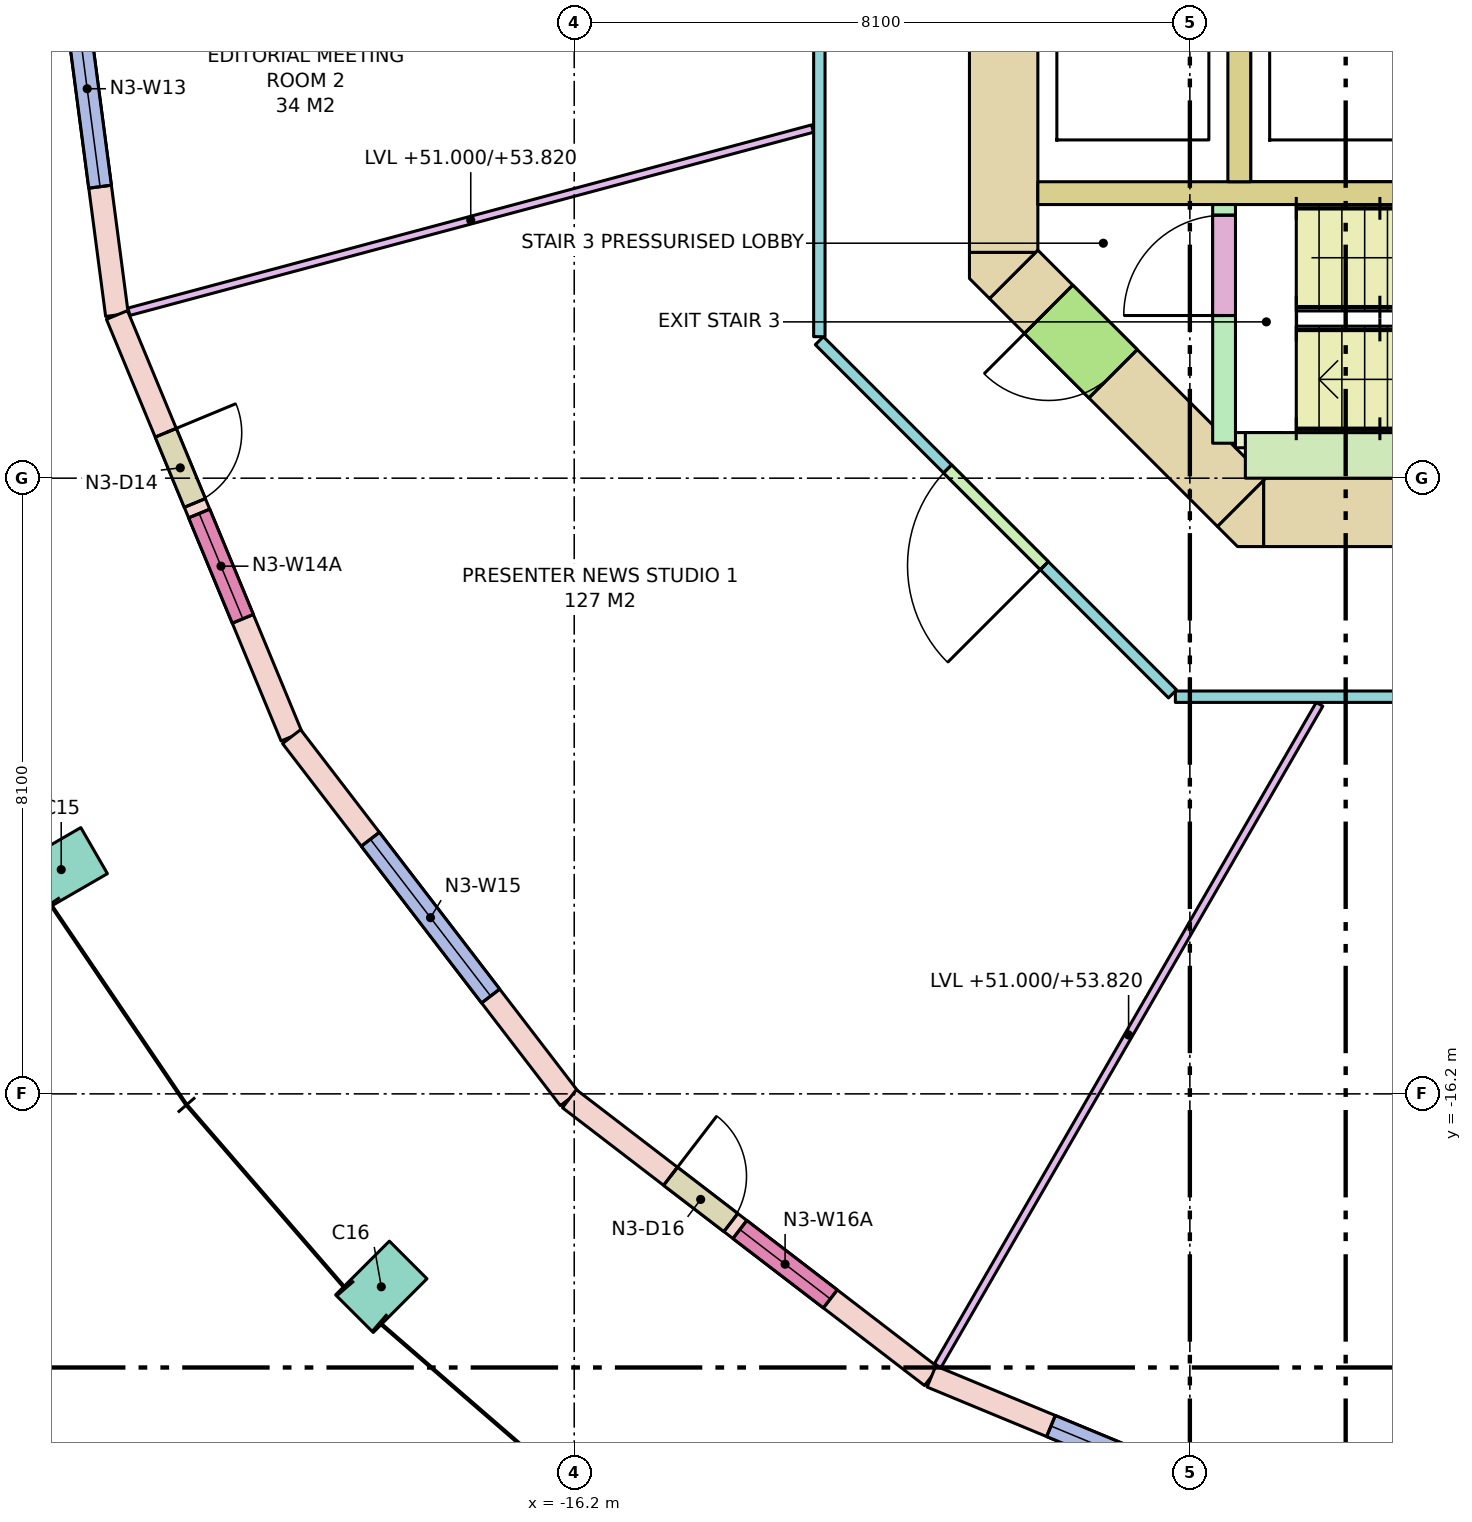
"""IFC4 building model, lengths in metres.
Left out: names, types, materials, properties, quantities, classifications, styles, units other than length and angle.
Written with IfcOpenShell. Run it as: python <this file> out.ifc"""

import sys

from ifc_helpers import new_model, si_unit, direction, frame, frame_2d, origin, origin_2d, place, context, subcontext, project, spatial, polyline, rectangle, outline, extrude, element, fill, save


model = new_model("IFC4")
c1 = context("Model", 3, precision=1e-05, world=origin(), true_north=direction((0.0, 1.0)))
c2 = subcontext(c1, "Body", "Model", "MODEL_VIEW")
j1 = project(units=[si_unit("LENGTHUNIT", "METRE"), si_unit("PLANEANGLEUNIT", "RADIAN")], contexts=[c1])
p1 = place(None, origin())
s1 = spatial("IfcSite", under=j1, at=p1, CompositionType="ELEMENT")
p2 = place(p1, origin())
s2 = spatial("IfcBuilding", under=s1, at=p2, CompositionType="ELEMENT")
p3 = place(p2, frame((0.0, 0.0, 51.0)))
s3 = spatial("IfcBuildingStorey", under=s2, at=p3, CompositionType="ELEMENT", Elevation=51.0)
for number, where, z_axis, x_axis in (
    (1, (-22.95, -13.25, 0.0), (0.0, 0.0, 1.0), (0.5, -0.866, 0.0)),
    (2, (-18.738, -18.738, 0.0), (0.0, 0.0, 1.0), (0.707, -0.707, 0.0)),
):
    element("IfcColumn", number, at=place(p3, frame(where, z_axis=z_axis, x_axis=x_axis)), inside=s3, PredefinedType="COLUMN", context=c2, shape_type="SweptSolid", body=[
        extrude(rectangle(XDim=0.7, YDim=1.0, at=origin_2d()), origin(), (0.0, 0.0, 1.0), 4.0),
    ])
p4 = place(p3, frame((-7.13, -8.55, -0.28), z_axis=(0.0, 0.0, 1.0), x_axis=(1.0, 0.0, 0.0)))
e3 = element("IfcWall", 3, at=p4, inside=s3, PredefinedType="SHEAR", context=c2, shape_type="SweptSolid", body=[
    extrude(rectangle(XDim=14.26, YDim=0.9, at=frame_2d((7.13, 0.0))), origin(), (0.0, 0.0, 1.0), 4.0),
])
p5 = place(p4, frame((8.08, 0.0, 0.28)))
e4 = element("IfcOpeningElement", 4, at=p5, cuts=e3, PredefinedType="OPENING", context=c2, shape_type="SweptSolid", body=[
    extrude(rectangle(XDim=0.7, YDim=2.1, at=frame_2d((0.35, 1.05))), frame((0.0, 0.46, 0.0), z_axis=(0.0, -1.0, 0.0), x_axis=(1.0, 0.0, 0.0)), (0.0, 0.0, 1.0), 0.92),
])
p6 = place(p4, frame((5.58, 0.0, 0.28)))
e5 = element("IfcOpeningElement", 5, at=p6, cuts=e3, PredefinedType="OPENING", context=c2, shape_type="SweptSolid", body=[
    extrude(rectangle(XDim=0.85, YDim=2.1, at=frame_2d((0.425, 1.05))), frame((0.0, 0.46, 0.0), z_axis=(0.0, -1.0, 0.0), x_axis=(1.0, 0.0, 0.0)), (0.0, 0.0, 1.0), 0.92),
])
p7 = place(p4, frame((6.88, 0.0, 0.28)))
e6 = element("IfcOpeningElement", 6, at=p7, cuts=e3, PredefinedType="OPENING", context=c2, shape_type="SweptSolid", body=[
    extrude(rectangle(XDim=0.85, YDim=2.1, at=frame_2d((0.425, 1.05))), frame((0.0, 0.46, 0.0), z_axis=(0.0, -1.0, 0.0), x_axis=(1.0, 0.0, 0.0)), (0.0, 0.0, 1.0), 0.92),
])
p8 = place(p4, frame((9.521, 0.0, 0.28)))
e7 = element("IfcOpeningElement", 7, at=p8, cuts=e3, PredefinedType="OPENING", context=c2, shape_type="SweptSolid", body=[
    extrude(rectangle(XDim=0.9, YDim=2.1, at=frame_2d((0.45, 1.05))), frame((0.0, 0.46, 0.0), z_axis=(0.0, -1.0, 0.0), x_axis=(1.0, 0.0, 0.0)), (0.0, 0.0, 1.0), 0.92),
])
p9 = place(p4, frame((11.278, 0.0, 0.28)))
e8 = element("IfcOpeningElement", 8, at=p9, cuts=e3, PredefinedType="OPENING", context=c2, shape_type="SweptSolid", body=[
    extrude(rectangle(XDim=0.9, YDim=2.1, at=frame_2d((0.45, 1.05))), frame((0.0, 0.46, 0.0), z_axis=(0.0, -1.0, 0.0), x_axis=(1.0, 0.0, 0.0)), (0.0, 0.0, 1.0), 0.92),
])
p10 = place(p4, frame((12.84, 0.0, 0.28)))
e9 = element("IfcOpeningElement", 9, at=p10, cuts=e3, PredefinedType="OPENING", context=c2, shape_type="SweptSolid", body=[
    extrude(rectangle(XDim=0.9, YDim=2.1, at=frame_2d((0.45, 1.05))), frame((0.0, 0.46, 0.0), z_axis=(0.0, -1.0, 0.0), x_axis=(1.0, 0.0, 0.0)), (0.0, 0.0, 1.0), 0.92),
])
p11 = place(p3, frame((-10.55, -5.13, -0.28), z_axis=(0.0, 0.0, 1.0), x_axis=(0.0, 1.0, 0.0)))
e10 = element("IfcWall", 10, at=p11, inside=s3, PredefinedType="SHEAR", context=c2, shape_type="SweptSolid", body=[
    extrude(rectangle(XDim=10.26, YDim=0.9, at=frame_2d((5.13, 0.0))), origin(), (0.0, 0.0, 1.0), 4.0),
])
p12 = place(p11, frame((4.13, 0.0, 0.28)))
e11 = element("IfcOpeningElement", 11, at=p12, cuts=e10, PredefinedType="OPENING", context=c2, shape_type="SweptSolid", body=[
    extrude(rectangle(XDim=2.0, YDim=2.1, at=frame_2d((1.0, 1.05))), frame((0.0, 0.46, 0.0), z_axis=(0.0, -1.0, 0.0), x_axis=(1.0, 0.0, 0.0)), (0.0, 0.0, 1.0), 0.92),
])
p13 = place(p3, frame((-7.418, -8.418, -0.28), z_axis=(0.0, 0.0, 1.0), x_axis=(-0.707106781187, 0.707106781187, 0.0)))
e12 = element("IfcWall", 12, at=p13, inside=s3, PredefinedType="SHEAR", context=c2, shape_type="SweptSolid", body=[
    extrude(rectangle(XDim=4.243, YDim=0.9, at=frame_2d((2.121, 0.0))), origin(), (0.0, 0.0, 1.0), 4.0),
])
p14 = place(p13, frame((2.393, 0.0, 0.28)))
e13 = element("IfcOpeningElement", 13, at=p14, cuts=e12, PredefinedType="OPENING", context=c2, shape_type="SweptSolid", body=[
    extrude(rectangle(XDim=1.2, YDim=2.1, at=frame_2d((0.6, 1.05))), frame((0.0, 0.46, 0.0), z_axis=(0.0, -1.0, 0.0), x_axis=(1.0, 0.0, 0.0)), (0.0, 0.0, 1.0), 0.92),
])
p15 = place(p3, frame((0.0, 0.0, -0.28)))
e14 = element("IfcWall", 14, at=p15, inside=s3, PredefinedType="SHEAR", context=c2, shape_type="SweptSolid", body=[
    extrude(outline(polyline([(-7.473, -9.0), (-7.736, -8.736), (-7.13, -8.13), (-7.13, -9.0), (-7.473, -9.0)])), origin(), (0.0, 0.0, 1.0), 4.0),
])
p16 = place(p3, frame((0.0, 0.0, -0.28)))
e15 = element("IfcWall", 15, at=p16, inside=s3, PredefinedType="SHEAR", context=c2, shape_type="SweptSolid", body=[
    extrude(outline(polyline([(-11.0, -5.473), (-11.0, -5.13), (-10.13, -5.13), (-10.736, -5.736), (-11.0, -5.473)])), origin(), (0.0, 0.0, 1.0), 4.0),
])
p17 = place(p3, frame((-10.1, -4.35, 0.0), z_axis=(0.0, 0.0, 1.0), x_axis=(1.0, 0.0, 0.0)))
e16 = element("IfcWall", 16, at=p17, inside=s3, PredefinedType="SOLIDWALL", context=c2, shape_type="SweptSolid", body=[
    extrude(rectangle(XDim=8.1, YDim=0.3, at=frame_2d((4.05, 0.0))), origin(), (0.0, 0.0, 1.0), 3.72),
])
p18 = place(p3, frame((-7.45, -4.2, 0.0), z_axis=(0.0, 0.0, 1.0), x_axis=(0.0, 1.0, 0.0)))
e17 = element("IfcWall", 17, at=p18, inside=s3, PredefinedType="SOLIDWALL", context=c2, shape_type="SweptSolid", body=[
    extrude(rectangle(XDim=2.4, YDim=0.3, at=frame_2d((1.2, 0.0))), origin(), (0.0, 0.0, 1.0), 3.72),
])
p19 = place(p3, frame((-7.65, -7.64, 0.0), z_axis=(0.0, 0.0, 1.0), x_axis=(0.0, 1.0, 0.0)))
e18 = element("IfcWall", 18, at=p19, inside=s3, PredefinedType="SHEAR", context=c2, shape_type="SweptSolid", body=[
    extrude(rectangle(XDim=3.14, YDim=0.3, at=frame_2d((1.57, 0.0))), origin(), (0.0, 0.0, 1.0), 3.72),
])
p20 = place(p19, frame((1.68, 0.0, 0.0)))
e19 = element("IfcOpeningElement", 19, at=p20, cuts=e18, PredefinedType="OPENING", context=c2, shape_type="SweptSolid", body=[
    extrude(rectangle(XDim=1.32, YDim=2.1, at=frame_2d((0.66, 1.05))), frame((0.0, 0.16, 0.0), z_axis=(0.0, -1.0, 0.0), x_axis=(1.0, 0.0, 0.0)), (0.0, 0.0, 1.0), 0.32),
])
p21 = place(p3, frame((-7.5, -7.6, 0.0), z_axis=(0.0, 0.0, 1.0), x_axis=(1.0, 0.0, 0.0)))
e20 = element("IfcWall", 20, at=p21, inside=s3, PredefinedType="SHEAR", context=c2, shape_type="SweptSolid", body=[
    extrude(rectangle(XDim=0.6, YDim=0.2, at=frame_2d((0.3, 0.0))), origin(), (0.0, 0.0, 1.0), 3.72),
])
p22 = place(p3, frame((-7.37, -7.8, 0.0), z_axis=(0.0, 0.0, 1.0), x_axis=(1.0, 0.0, 0.0)))
e21 = element("IfcWall", 21, at=p22, inside=s3, PredefinedType="SHEAR", context=c2, shape_type="SweptSolid", body=[
    extrude(rectangle(XDim=5.37, YDim=0.6, at=frame_2d((2.685, 0.0))), origin(), (0.0, 0.0, 1.0), 3.72),
])
p23 = place(p3, frame((-23.0, 0.0, 0.0), z_axis=(0.0, 0.0, 1.0), x_axis=(0.130522880875, -0.991445297315, 0.0)))
e22 = element("IfcWall", 22, at=p23, inside=s3, PredefinedType="STANDARD", context=c2, shape_type="SweptSolid", body=[
    extrude(rectangle(XDim=6.004, YDim=0.3, at=frame_2d((3.002, 0.0))), origin(), (0.0, 0.0, 1.0), 3.72),
])
p24 = place(p23, frame((1.702, 0.0, 0.8)))
e23 = element("IfcOpeningElement", 23, at=p24, cuts=e22, PredefinedType="OPENING", context=c2, shape_type="SweptSolid", body=[
    extrude(rectangle(XDim=2.6, YDim=2.7, at=frame_2d((1.3, 1.35))), frame((0.0, 0.16, 0.0), z_axis=(0.0, -1.0, 0.0), x_axis=(1.0, 0.0, 0.0)), (0.0, 0.0, 1.0), 0.32),
])
p25 = place(p3, frame((-22.216, -5.953, 0.0), z_axis=(0.0, 0.0, 1.0), x_axis=(0.382671411433, -0.923884511653, 0.0)))
e24 = element("IfcWall", 24, at=p25, inside=s3, PredefinedType="STANDARD", context=c2, shape_type="SweptSolid", body=[
    extrude(rectangle(XDim=6.004, YDim=0.3, at=frame_2d((3.002, 0.0))), origin(), (0.0, 0.0, 1.0), 3.72),
])
p26 = place(p25, frame((1.677, 0.0, 0.0)))
e25 = element("IfcOpeningElement", 25, at=p26, cuts=e24, PredefinedType="OPENING", context=c2, shape_type="SweptSolid", body=[
    extrude(rectangle(XDim=1.0, YDim=2.4, at=frame_2d((0.5, 1.2))), frame((0.0, 0.16, 0.0), z_axis=(0.0, -1.0, 0.0), x_axis=(1.0, 0.0, 0.0)), (0.0, 0.0, 1.0), 0.32),
])
p27 = place(p25, frame((2.827, 0.0, 0.8)))
e26 = element("IfcOpeningElement", 26, at=p27, cuts=e24, PredefinedType="OPENING", context=c2, shape_type="SweptSolid", body=[
    extrude(rectangle(XDim=1.5, YDim=2.7, at=frame_2d((0.75, 1.35))), frame((0.0, 0.16, 0.0), z_axis=(0.0, -1.0, 0.0), x_axis=(1.0, 0.0, 0.0)), (0.0, 0.0, 1.0), 0.32),
])
p28 = place(p3, frame((-19.919, -11.5, 0.0), z_axis=(0.0, 0.0, 1.0), x_axis=(0.608778912074, -0.793339924758, 0.0)))
e27 = element("IfcWall", 27, at=p28, inside=s3, PredefinedType="STANDARD", context=c2, shape_type="SweptSolid", body=[
    extrude(rectangle(XDim=6.004, YDim=0.3, at=frame_2d((3.002, 0.0))), origin(), (0.0, 0.0, 1.0), 3.72),
])
p29 = place(p28, frame((1.702, 0.0, 0.8)))
e28 = element("IfcOpeningElement", 28, at=p29, cuts=e27, PredefinedType="OPENING", context=c2, shape_type="SweptSolid", body=[
    extrude(rectangle(XDim=2.6, YDim=2.7, at=frame_2d((1.3, 1.35))), frame((0.0, 0.16, 0.0), z_axis=(0.0, -1.0, 0.0), x_axis=(1.0, 0.0, 0.0)), (0.0, 0.0, 1.0), 0.32),
])
p30 = place(p3, frame((-16.263, -16.263, 0.0), z_axis=(0.0, 0.0, 1.0), x_axis=(0.793339924758, -0.608778912074, 0.0)))
e29 = element("IfcWall", 29, at=p30, inside=s3, PredefinedType="STANDARD", context=c2, shape_type="SweptSolid", body=[
    extrude(rectangle(XDim=6.004, YDim=0.3, at=frame_2d((3.002, 0.0))), origin(), (0.0, 0.0, 1.0), 3.72),
])
p31 = place(p30, frame((1.677, 0.0, 0.0)))
e30 = element("IfcOpeningElement", 30, at=p31, cuts=e29, PredefinedType="OPENING", context=c2, shape_type="SweptSolid", body=[
    extrude(rectangle(XDim=1.0, YDim=2.4, at=frame_2d((0.5, 1.2))), frame((0.0, 0.16, 0.0), z_axis=(0.0, -1.0, 0.0), x_axis=(1.0, 0.0, 0.0)), (0.0, 0.0, 1.0), 0.32),
])
p32 = place(p30, frame((2.827, 0.0, 0.8)))
e31 = element("IfcOpeningElement", 31, at=p32, cuts=e29, PredefinedType="OPENING", context=c2, shape_type="SweptSolid", body=[
    extrude(rectangle(XDim=1.5, YDim=2.7, at=frame_2d((0.75, 1.35))), frame((0.0, 0.16, 0.0), z_axis=(0.0, -1.0, 0.0), x_axis=(1.0, 0.0, 0.0)), (0.0, 0.0, 1.0), 0.32),
])
p33 = place(p3, frame((-11.5, -19.919, 0.0), z_axis=(0.0, 0.0, 1.0), x_axis=(0.923884511653, -0.382671411433, 0.0)))
e32 = element("IfcWall", 32, at=p33, inside=s3, PredefinedType="STANDARD", context=c2, shape_type="SweptSolid", body=[
    extrude(rectangle(XDim=6.004, YDim=0.3, at=frame_2d((3.002, 0.0))), origin(), (0.0, 0.0, 1.0), 3.72),
])
p34 = place(p33, frame((1.702, 0.0, 0.8)))
e33 = element("IfcOpeningElement", 33, at=p34, cuts=e32, PredefinedType="OPENING", context=c2, shape_type="SweptSolid", body=[
    extrude(rectangle(XDim=2.6, YDim=2.7, at=frame_2d((1.3, 1.35))), frame((0.0, 0.16, 0.0), z_axis=(0.0, -1.0, 0.0), x_axis=(1.0, 0.0, 0.0)), (0.0, 0.0, 1.0), 0.32),
])
p35 = place(p3, frame((-1.275, -10.975, 0.0), z_axis=(0.0, 0.0, 1.0), x_axis=(-1.0, 0.0, 0.0)))
e34 = element("IfcWall", 34, at=p35, inside=s3, PredefinedType="PARTITIONING", context=c2, shape_type="SweptSolid", body=[
    extrude(rectangle(XDim=7.016, YDim=0.15, at=frame_2d((3.508, 0.0))), origin(), (0.0, 0.0, 1.0), 2.82),
])
p36 = place(p3, frame((-8.328, -10.938, 0.0), z_axis=(0.0, 0.0, 1.0), x_axis=(-0.707125355289, 0.707088206597, 0.0)))
e35 = element("IfcWall", 35, at=p36, inside=s3, PredefinedType="PARTITIONING", context=c2, shape_type="SweptSolid", body=[
    extrude(rectangle(XDim=6.572, YDim=0.15, at=frame_2d((3.286, 0.0))), origin(), (0.0, 0.0, 1.0), 2.82),
])
p37 = place(p36, frame((2.386, 0.0, 0.0)))
e36 = element("IfcOpeningElement", 36, at=p37, cuts=e35, PredefinedType="OPENING", context=c2, shape_type="SweptSolid", body=[
    extrude(rectangle(XDim=1.8, YDim=2.1, at=frame_2d((0.9, 1.05))), frame((0.0, 0.085, 0.0), z_axis=(0.0, -1.0, 0.0), x_axis=(1.0, 0.0, 0.0)), (0.0, 0.0, 1.0), 0.17),
])
p38 = place(p3, frame((-12.975, -6.238, 0.0), z_axis=(0.0, 0.0, 1.0), x_axis=(0.0, 1.0, 0.0)))
e37 = element("IfcWall", 37, at=p38, inside=s3, PredefinedType="PARTITIONING", context=c2, shape_type="SweptSolid", body=[
    extrude(rectangle(XDim=4.963, YDim=0.15, at=frame_2d((2.482, 0.0))), origin(), (0.0, 0.0, 1.0), 2.82),
])
p39 = place(p3, frame((-13.064, -3.5, 0.0), z_axis=(0.0, 0.0, 1.0), x_axis=(-0.965922655056, -0.258830880017, 0.0)))
e38 = element("IfcWall", 38, at=p39, inside=s3, PredefinedType="PARTITIONING", context=c2, shape_type="SweptSolid", body=[
    extrude(rectangle(XDim=9.312, YDim=0.1, at=frame_2d((4.656, 0.0))), origin(), (0.0, 0.0, 1.0), 2.82),
])
p40 = place(p3, frame((-6.394, -11.075, 0.0), z_axis=(0.0, 0.0, 1.0), x_axis=(-0.500024592647, -0.866011204747, 0.0)))
e39 = element("IfcWall", 39, at=p40, inside=s3, PredefinedType="PARTITIONING", context=c2, shape_type="SweptSolid", body=[
    extrude(rectangle(XDim=10.049, YDim=0.1, at=frame_2d((5.024, 0.0))), origin(), (0.0, 0.0, 1.0), 2.82),
])
p41 = place(p24, origin())
e40 = element("IfcWindow", 40, at=p41, inside=s3, PartitioningType="SINGLE_PANEL", PredefinedType="WINDOW", context=c2, shape_type="SweptSolid", body=[
    extrude(rectangle(XDim=2.6, YDim=2.7, at=frame_2d((1.3, 1.35))), frame((0.0, 0.03, 0.0), z_axis=(0.0, -1.0, 0.0), x_axis=(1.0, 0.0, 0.0)), (0.0, 0.0, 1.0), 0.06),
])
fill(e23, e40)
p42 = place(p26, origin())
e41 = element("IfcDoor", 41, at=p42, inside=s3, OperationType="SINGLE_SWING_LEFT", PredefinedType="DOOR", context=c2, shape_type="SweptSolid", body=[
    extrude(rectangle(XDim=1.0, YDim=2.4, at=frame_2d((0.5, 1.2))), frame((0.0, 0.025, 0.0), z_axis=(0.0, -1.0, 0.0), x_axis=(1.0, 0.0, 0.0)), (0.0, 0.0, 1.0), 0.05),
])
fill(e25, e41)
p43 = place(p27, origin())
e42 = element("IfcWindow", 42, at=p43, inside=s3, PartitioningType="SINGLE_PANEL", PredefinedType="WINDOW", context=c2, shape_type="SweptSolid", body=[
    extrude(rectangle(XDim=1.5, YDim=2.7, at=frame_2d((0.75, 1.35))), frame((0.0, 0.03, 0.0), z_axis=(0.0, -1.0, 0.0), x_axis=(1.0, 0.0, 0.0)), (0.0, 0.0, 1.0), 0.06),
])
fill(e26, e42)
p44 = place(p29, origin())
e43 = element("IfcWindow", 43, at=p44, inside=s3, PartitioningType="SINGLE_PANEL", PredefinedType="WINDOW", context=c2, shape_type="SweptSolid", body=[
    extrude(rectangle(XDim=2.6, YDim=2.7, at=frame_2d((1.3, 1.35))), frame((0.0, 0.03, 0.0), z_axis=(0.0, -1.0, 0.0), x_axis=(1.0, 0.0, 0.0)), (0.0, 0.0, 1.0), 0.06),
])
fill(e28, e43)
p45 = place(p31, origin())
e44 = element("IfcDoor", 44, at=p45, inside=s3, OperationType="SINGLE_SWING_LEFT", PredefinedType="DOOR", context=c2, shape_type="SweptSolid", body=[
    extrude(rectangle(XDim=1.0, YDim=2.4, at=frame_2d((0.5, 1.2))), frame((0.0, 0.025, 0.0), z_axis=(0.0, -1.0, 0.0), x_axis=(1.0, 0.0, 0.0)), (0.0, 0.0, 1.0), 0.05),
])
fill(e30, e44)
p46 = place(p32, origin())
e45 = element("IfcWindow", 45, at=p46, inside=s3, PartitioningType="SINGLE_PANEL", PredefinedType="WINDOW", context=c2, shape_type="SweptSolid", body=[
    extrude(rectangle(XDim=1.5, YDim=2.7, at=frame_2d((0.75, 1.35))), frame((0.0, 0.03, 0.0), z_axis=(0.0, -1.0, 0.0), x_axis=(1.0, 0.0, 0.0)), (0.0, 0.0, 1.0), 0.06),
])
fill(e31, e45)
p47 = place(p34, origin())
e46 = element("IfcWindow", 46, at=p47, inside=s3, PartitioningType="SINGLE_PANEL", PredefinedType="WINDOW", context=c2, shape_type="SweptSolid", body=[
    extrude(rectangle(XDim=2.6, YDim=2.7, at=frame_2d((1.3, 1.35))), frame((0.0, 0.03, 0.0), z_axis=(0.0, -1.0, 0.0), x_axis=(1.0, 0.0, 0.0)), (0.0, 0.0, 1.0), 0.06),
])
fill(e33, e46)
p48 = place(p20, origin())
e47 = element("IfcDoor", 47, at=p48, inside=s3, OperationType="DOUBLE_DOOR_SINGLE_SWING", PredefinedType="DOOR", context=c2, shape_type="SweptSolid", body=[
    extrude(rectangle(XDim=1.32, YDim=2.1, at=frame_2d((0.66, 1.05))), frame((0.0, 0.025, 0.0), z_axis=(0.0, -1.0, 0.0), x_axis=(1.0, 0.0, 0.0)), (0.0, 0.0, 1.0), 0.05),
])
fill(e19, e47)
p49 = place(p14, origin())
e48 = element("IfcDoor", 48, at=p49, inside=s3, OperationType="SINGLE_SWING_RIGHT", PredefinedType="DOOR", context=c2, shape_type="SweptSolid", body=[
    extrude(rectangle(XDim=1.2, YDim=2.1, at=frame_2d((0.6, 1.05))), frame((0.0, 0.025, 0.0), z_axis=(0.0, -1.0, 0.0), x_axis=(1.0, 0.0, 0.0)), (0.0, 0.0, 1.0), 0.05),
])
fill(e13, e48)
p50 = place(p37, origin())
e49 = element("IfcDoor", 49, at=p50, inside=s3, OperationType="DOUBLE_DOOR_SINGLE_SWING", PredefinedType="DOOR", context=c2, shape_type="SweptSolid", body=[
    extrude(rectangle(XDim=1.8, YDim=2.1, at=frame_2d((0.9, 1.05))), frame((0.0, 0.025, 0.0), z_axis=(0.0, -1.0, 0.0), x_axis=(1.0, 0.0, 0.0)), (0.0, 0.0, 1.0), 0.05),
])
fill(e36, e49)
save(model, sys.argv[1])
